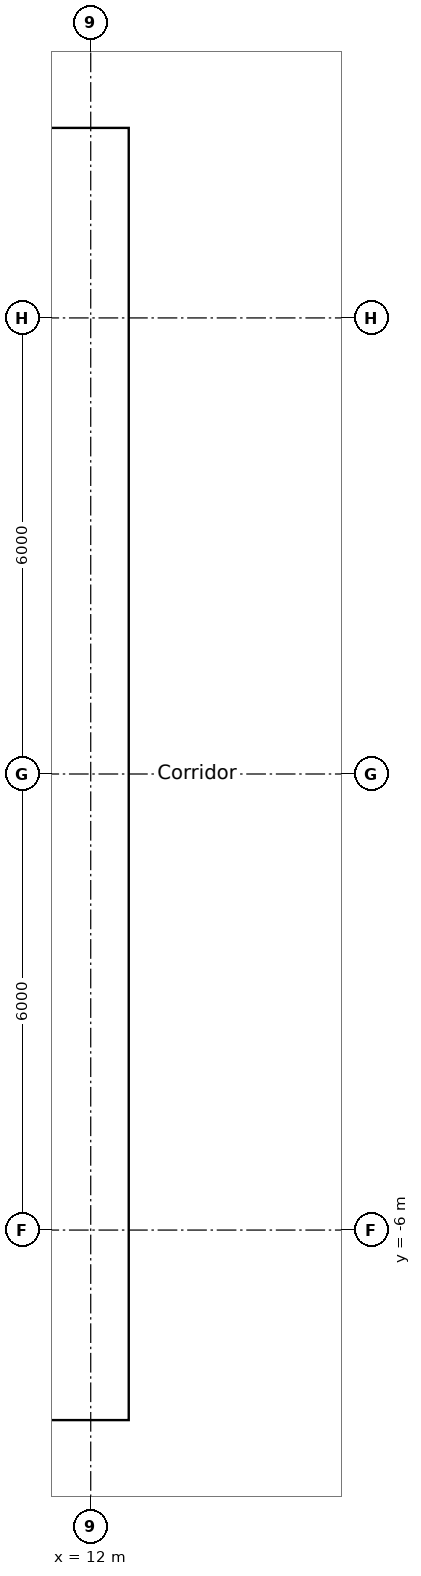
"""IFC4 building model, lengths in metres.
Left out: names, types, materials, properties, quantities, classifications, styles, units other than length and angle.
Written with IfcOpenShell. Run it as: python <this file> out.ifc"""

import sys

from ifc_helpers import new_model, si_unit, direction, frame, frame_2d, origin, place, context, subcontext, project, spatial, rectangle, extrude, element, fill, save


model = new_model("IFC4")
c1 = context("Model", 3, precision=1e-05, world=origin(), true_north=direction((0.0, 1.0)))
c2 = subcontext(c1, "Body", "Model", "MODEL_VIEW")
j1 = project(units=[si_unit("LENGTHUNIT", "METRE"), si_unit("PLANEANGLEUNIT", "RADIAN")], contexts=[c1])
p1 = place(None, origin())
s1 = spatial("IfcSite", under=j1, at=p1, CompositionType="ELEMENT")
p2 = place(p1, origin())
s2 = spatial("IfcBuilding", under=s1, at=p2, CompositionType="ELEMENT")
p3 = place(p2, frame((0.0, 0.0, 212.4)))
s3 = spatial("IfcBuildingStorey", under=s2, at=p3, CompositionType="ELEMENT", Elevation=212.4)
p4 = place(p3, frame((-12.5, -8.05, 0.0), z_axis=(0.0, 0.0, 1.0), x_axis=(1.0, 0.0, 0.0)))
e1 = element("IfcWall", 1, at=p4, inside=s3, PredefinedType="SOLIDWALL", context=c2, shape_type="SweptSolid", body=[
    extrude(rectangle(XDim=25.0, YDim=0.9, at=frame_2d((12.5, 0.0))), origin(), (0.0, 0.0, 1.0), 3.6),
])
p5 = place(p4, frame((13.4, 0.0, 0.0)))
e2 = element("IfcOpeningElement", 2, at=p5, cuts=e1, PredefinedType="OPENING", context=c2, shape_type="SweptSolid", body=[
    extrude(rectangle(XDim=1.0, YDim=2.1, at=frame_2d((0.5, 1.05))), frame((0.0, 0.45, 0.0), z_axis=(0.0, -1.0, 0.0), x_axis=(1.0, 0.0, 0.0)), (0.0, 0.0, 1.0), 0.9),
])
p6 = place(p4, frame((8.3, 0.0, 0.0)))
e3 = element("IfcOpeningElement", 3, at=p6, cuts=e1, PredefinedType="OPENING", context=c2, shape_type="SweptSolid", body=[
    extrude(rectangle(XDim=1.8, YDim=2.1, at=frame_2d((0.9, 1.05))), frame((0.0, 0.45, 0.0), z_axis=(0.0, -1.0, 0.0), x_axis=(1.0, 0.0, 0.0)), (0.0, 0.0, 1.0), 0.9),
])
p7 = place(p4, frame((14.9, 0.0, 0.0)))
e4 = element("IfcOpeningElement", 4, at=p7, cuts=e1, PredefinedType="OPENING", context=c2, shape_type="SweptSolid", body=[
    extrude(rectangle(XDim=1.8, YDim=2.1, at=frame_2d((0.9, 1.05))), frame((0.0, 0.45, 0.0), z_axis=(0.0, -1.0, 0.0), x_axis=(1.0, 0.0, 0.0)), (0.0, 0.0, 1.0), 0.9),
])
p8 = place(p3, frame((-12.5, 8.05, 0.0), z_axis=(0.0, 0.0, 1.0), x_axis=(1.0, 0.0, 0.0)))
e5 = element("IfcWall", 5, at=p8, inside=s3, PredefinedType="SOLIDWALL", context=c2, shape_type="SweptSolid", body=[
    extrude(rectangle(XDim=25.0, YDim=0.9, at=frame_2d((12.5, 0.0))), origin(), (0.0, 0.0, 1.0), 3.6),
])
p9 = place(p8, frame((8.3, 0.0, 0.0)))
e6 = element("IfcOpeningElement", 6, at=p9, cuts=e5, PredefinedType="OPENING", context=c2, shape_type="SweptSolid", body=[
    extrude(rectangle(XDim=1.8, YDim=2.1, at=frame_2d((0.9, 1.05))), frame((0.0, 0.45, 0.0), z_axis=(0.0, -1.0, 0.0), x_axis=(1.0, 0.0, 0.0)), (0.0, 0.0, 1.0), 0.9),
])
p10 = place(p3, frame((12.05, -7.6, 0.0), z_axis=(0.0, 0.0, 1.0), x_axis=(0.0, 1.0, 0.0)))
e7 = element("IfcWall", 7, at=p10, inside=s3, PredefinedType="SOLIDWALL", context=c2, shape_type="SweptSolid", body=[
    extrude(rectangle(XDim=15.2, YDim=0.9, at=frame_2d((7.6, 0.0))), origin(), (0.0, 0.0, 1.0), 3.6),
])
p11 = place(p10, frame((5.1, 0.0, 0.0)))
e8 = element("IfcOpeningElement", 8, at=p11, cuts=e7, PredefinedType="OPENING", context=c2, shape_type="SweptSolid", body=[
    extrude(rectangle(XDim=1.0, YDim=2.1, at=frame_2d((0.5, 1.05))), frame((0.0, 0.45, 0.0), z_axis=(0.0, -1.0, 0.0), x_axis=(1.0, 0.0, 0.0)), (0.0, 0.0, 1.0), 0.9),
])
p12 = place(p3, frame((9.2, -4.55, 0.0), z_axis=(0.0, 0.0, 1.0), x_axis=(1.0, 0.0, 0.0)))
e9 = element("IfcWall", 9, at=p12, inside=s3, PredefinedType="SOLIDWALL", context=c2, shape_type="SweptSolid", body=[
    extrude(rectangle(XDim=2.4, YDim=0.3, at=frame_2d((1.2, 0.0))), origin(), (0.0, 0.0, 1.0), 3.3),
])
p13 = place(p12, frame((0.65, 0.0, 0.0)))
e10 = element("IfcOpeningElement", 10, at=p13, cuts=e9, PredefinedType="OPENING", context=c2, shape_type="SweptSolid", body=[
    extrude(rectangle(XDim=1.1, YDim=2.1, at=frame_2d((0.55, 1.05))), frame((0.0, 0.15, 0.0), z_axis=(0.0, -1.0, 0.0), x_axis=(1.0, 0.0, 0.0)), (0.0, 0.0, 1.0), 0.3),
])
p14 = place(p3, frame((9.2, 4.55, 0.0), z_axis=(0.0, 0.0, 1.0), x_axis=(1.0, 0.0, 0.0)))
e11 = element("IfcWall", 11, at=p14, inside=s3, PredefinedType="SOLIDWALL", context=c2, shape_type="SweptSolid", body=[
    extrude(rectangle(XDim=2.4, YDim=0.3, at=frame_2d((1.2, 0.0))), origin(), (0.0, 0.0, 1.0), 3.3),
])
p15 = place(p14, frame((0.65, 0.0, 0.0)))
e12 = element("IfcOpeningElement", 12, at=p15, cuts=e11, PredefinedType="OPENING", context=c2, shape_type="SweptSolid", body=[
    extrude(rectangle(XDim=1.1, YDim=2.1, at=frame_2d((0.55, 1.05))), frame((0.0, 0.15, 0.0), z_axis=(0.0, -1.0, 0.0), x_axis=(1.0, 0.0, 0.0)), (0.0, 0.0, 1.0), 0.3),
])
p16 = place(p3, frame((15.235, 12.784, 0.0), z_axis=(0.0, 0.0, 1.0), x_axis=(0.499940714931, -0.86605962933, 0.0)))
e13 = element("IfcWall", 13, at=p16, inside=s3, PredefinedType="PARTITIONING", context=c2, shape_type="SweptSolid", body=[
    extrude(rectangle(XDim=6.907, YDim=0.15, at=frame_2d((3.454, 0.0))), origin(), (0.0, 0.0, 1.0), 3.15),
])
p17 = place(p16, frame((5.249, 0.0, 0.0)))
e14 = element("IfcOpeningElement", 14, at=p17, cuts=e13, PredefinedType="OPENING", context=c2, shape_type="SweptSolid", body=[
    extrude(rectangle(XDim=1.0, YDim=2.1, at=frame_2d((0.5, 1.05))), frame((0.0, 0.075, 0.0), z_axis=(0.0, -1.0, 0.0), x_axis=(1.0, 0.0, 0.0)), (0.0, 0.0, 1.0), 0.15),
])
p18 = place(p16, frame((3.041, 0.0, 0.0)))
e15 = element("IfcOpeningElement", 15, at=p18, cuts=e13, PredefinedType="OPENING", context=c2, shape_type="SweptSolid", body=[
    extrude(rectangle(XDim=1.0, YDim=2.1, at=frame_2d((0.5, 1.05))), frame((0.0, 0.075, 0.0), z_axis=(0.0, -1.0, 0.0), x_axis=(1.0, 0.0, 0.0)), (0.0, 0.0, 1.0), 0.15),
])
p19 = place(p3, frame((15.235, -12.784, 0.0), z_axis=(0.0, 0.0, 1.0), x_axis=(0.499914202267, 0.866074933462, 0.0)))
e16 = element("IfcWall", 16, at=p19, inside=s3, PredefinedType="PARTITIONING", context=c2, shape_type="SweptSolid", body=[
    extrude(rectangle(XDim=6.907, YDim=0.15, at=frame_2d((3.454, 0.0))), origin(), (0.0, 0.0, 1.0), 3.15),
])
p20 = place(p19, frame((3.003, 0.0, 0.0)))
e17 = element("IfcOpeningElement", 17, at=p20, cuts=e16, PredefinedType="OPENING", context=c2, shape_type="SweptSolid", body=[
    extrude(rectangle(XDim=1.8, YDim=2.1, at=frame_2d((0.9, 1.05))), frame((0.0, 0.075, 0.0), z_axis=(0.0, -1.0, 0.0), x_axis=(1.0, 0.0, 0.0)), (0.0, 0.0, 1.0), 0.15),
])
p21 = place(p11, origin())
e18 = element("IfcDoor", 18, at=p21, inside=s3, OperationType="DOUBLE_DOOR_SINGLE_SWING", PredefinedType="DOOR", context=c2, shape_type="SweptSolid", body=[
    extrude(rectangle(XDim=1.0, YDim=2.1, at=frame_2d((0.5, 1.05))), frame((0.0, 0.025, 0.0), z_axis=(0.0, -1.0, 0.0), x_axis=(1.0, 0.0, 0.0)), (0.0, 0.0, 1.0), 0.05),
])
fill(e8, e18)
save(model, sys.argv[1])
